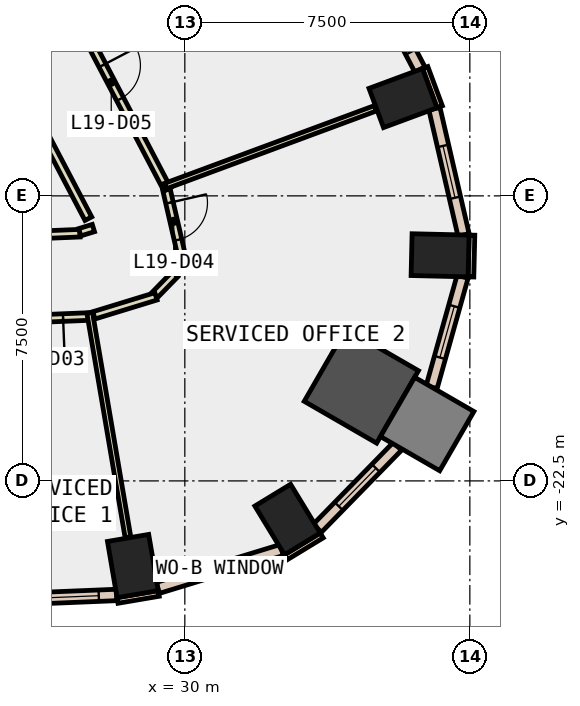
"""IFC4 building model, lengths in metres.
Left out: names, types, materials, properties, quantities, classifications, styles, units other than length and angle.
Written with IfcOpenShell. Run it as: python <this file> out.ifc"""

import sys

from ifc_helpers import new_model, si_unit, direction, frame, frame_2d, origin, origin_2d, place, context, subcontext, project, spatial, rectangle, extrude, element, fill, save


model = new_model("IFC4")
c1 = context("Model", 3, precision=1e-05, world=origin(), true_north=direction((0.0, 1.0)))
c2 = subcontext(c1, "Body", "Model", "MODEL_VIEW")
j1 = project(units=[si_unit("LENGTHUNIT", "METRE"), si_unit("PLANEANGLEUNIT", "RADIAN")], contexts=[c1])
p1 = place(None, origin())
s1 = spatial("IfcSite", under=j1, at=p1, CompositionType="ELEMENT")
p2 = place(p1, origin())
s2 = spatial("IfcBuilding", under=s1, at=p2, CompositionType="ELEMENT")
p3 = place(p2, frame((0.0, 0.0, 90.8)))
s3 = spatial("IfcBuildingStorey", under=s2, at=p3, CompositionType="ELEMENT", Elevation=90.8)
for number, where, z_axis, x_axis in (
    (1, (28.633, -24.74, -0.4), (0.0, 0.0, 1.0), (0.986, 0.168, 0.0)),
    (2, (32.703, -23.516, -0.4), (0.0, 0.0, 1.0), (0.854, 0.52, 0.0)),
):
    element("IfcColumn", number, at=place(p3, frame(where, z_axis=z_axis, x_axis=x_axis)), inside=s3, PredefinedType="COLUMN", context=c2, shape_type="SweptSolid", body=[
        extrude(rectangle(XDim=1.1, YDim=1.5, at=origin_2d()), origin(), (0.0, 0.0, 1.0), 4.2),
    ])
p4 = place(p3, frame((34.645, -20.003, -0.4), z_axis=(0.0, 0.0, 1.0), x_axis=(-0.866025403784, 0.5, 0.0)))
e3 = element("IfcColumn", 3, at=p4, inside=s3, PredefinedType="COLUMN", context=c2, shape_type="SweptSolid", body=[
    extrude(rectangle(XDim=2.2, YDim=2.2, at=origin_2d()), origin(), (0.0, 0.0, 1.0), 4.2),
])
for number, where, z_axis, x_axis in (
    (4, (36.717, -16.564, -0.4), (0.0, 0.0, 1.0), (0.023, 1.0, 0.0)),
    (5, (35.741, -12.427, -0.4), (0.0, 0.0, 1.0), (-0.347, 0.938, 0.0)),
):
    element("IfcColumn", number, at=place(p3, frame(where, z_axis=z_axis, x_axis=x_axis)), inside=s3, PredefinedType="COLUMN", context=c2, shape_type="SweptSolid", body=[
        extrude(rectangle(XDim=1.1, YDim=1.5, at=origin_2d()), origin(), (0.0, 0.0, 1.0), 4.2),
    ])
p5 = place(p3, frame((36.377, -21.003, -0.4), z_axis=(0.0, 0.0, 1.0), x_axis=(-0.866025403784, 0.5, 0.0)))
e6 = element("IfcColumn", 6, at=p5, inside=s3, PredefinedType="COLUMN", context=c2, shape_type="SweptSolid", body=[
    extrude(rectangle(XDim=1.8, YDim=1.8, at=origin_2d()), origin(), (0.0, 0.0, 1.0), 4.2),
])
p6 = place(p3, frame((36.706, -12.656, 0.0), z_axis=(0.0, 0.0, 1.0), x_axis=(-0.347205967468, 0.937788897436, 0.0)))
e7 = element("IfcWall", 7, at=p6, inside=s3, PredefinedType="STANDARD", context=c2, shape_type="SweptSolid", body=[
    extrude(rectangle(XDim=1.1, YDim=0.15, at=frame_2d((0.55, 0.0))), origin(), (0.0, 0.0, 1.0), 3.8),
])
p7 = place(p3, frame((28.229, -25.646, 0.0), z_axis=(0.0, 0.0, 1.0), x_axis=(0.985763338892, 0.168138751323, 0.0)))
e8 = element("IfcWall", 8, at=p7, inside=s3, PredefinedType="STANDARD", context=c2, shape_type="SweptSolid", body=[
    extrude(rectangle(XDim=1.101, YDim=0.15, at=frame_2d((0.55, 0.0))), origin(), (0.0, 0.0, 1.0), 3.8),
])
for number, where, z_axis, x_axis in (
    (9, (32.662, -24.507, 0.0), (0.0, 0.0, 1.0), (0.854, 0.52, 0.0)),
    (10, (37.529, -17.133, 0.0), (0.0, 0.0, 1.0), (0.024, 1.0, 0.0)),
):
    element("IfcWall", number, at=place(p3, frame(where, z_axis=z_axis, x_axis=x_axis)), inside=s3, PredefinedType="STANDARD", context=c2, shape_type="SweptSolid", body=[
        extrude(rectangle(XDim=1.1, YDim=0.15, at=frame_2d((0.55, 0.0))), origin(), (0.0, 0.0, 1.0), 3.8),
    ])
p8 = place(p3, frame((22.332, -25.742, 0.0), z_axis=(0.0, 0.0, 1.0), x_axis=(0.999159360905, 0.040994774244, 0.0)))
e11 = element("IfcWall", 11, at=p8, inside=s3, PredefinedType="STANDARD", context=c2, shape_type="SweptSolid", body=[
    extrude(rectangle(XDim=5.878, YDim=0.3, at=frame_2d((2.939, 0.0))), origin(), (0.0, 0.0, 1.0), 3.8),
])
p9 = place(p8, frame((0.469, 0.0, 0.9)))
e12 = element("IfcOpeningElement", 12, at=p9, cuts=e11, PredefinedType="OPENING", context=c2, shape_type="SweptSolid", body=[
    extrude(rectangle(XDim=2.0, YDim=2.6, at=frame_2d((1.0, 1.3))), frame((0.0, 0.16, 0.0), z_axis=(0.0, -1.0, 0.0), x_axis=(1.0, 0.0, 0.0)), (0.0, 0.0, 1.0), 0.32),
])
p10 = place(p8, frame((3.408, 0.0, 0.9)))
e13 = element("IfcOpeningElement", 13, at=p10, cuts=e11, PredefinedType="OPENING", context=c2, shape_type="SweptSolid", body=[
    extrude(rectangle(XDim=2.0, YDim=2.6, at=frame_2d((1.0, 1.3))), frame((0.0, 0.16, 0.0), z_axis=(0.0, -1.0, 0.0), x_axis=(1.0, 0.0, 0.0)), (0.0, 0.0, 1.0), 0.32),
])
p11 = place(p3, frame((29.288, -25.316, 0.0), z_axis=(0.0, 0.0, 1.0), x_axis=(0.956317661006, 0.292329490895, 0.0)))
e14 = element("IfcWall", 14, at=p11, inside=s3, PredefinedType="STANDARD", context=c2, shape_type="SweptSolid", body=[
    extrude(rectangle(XDim=3.41, YDim=0.3, at=frame_2d((1.705, 0.0))), origin(), (0.0, 0.0, 1.0), 3.8),
])
p12 = place(p11, frame((1.005, 0.0, 0.9)))
e15 = element("IfcOpeningElement", 15, at=p12, cuts=e14, PredefinedType="OPENING", context=c2, shape_type="SweptSolid", body=[
    extrude(rectangle(XDim=1.4, YDim=2.6, at=frame_2d((0.7, 1.3))), frame((0.0, 0.16, 0.0), z_axis=(0.0, -1.0, 0.0), x_axis=(1.0, 0.0, 0.0)), (0.0, 0.0, 1.0), 0.32),
])
p13 = place(p3, frame((33.486, -23.747, 0.0), z_axis=(0.0, 0.0, 1.0), x_axis=(0.698928244773, 0.715191798512, 0.0)))
e16 = element("IfcWall", 16, at=p13, inside=s3, PredefinedType="STANDARD", context=c2, shape_type="SweptSolid", body=[
    extrude(rectangle(XDim=3.017, YDim=0.3, at=frame_2d((1.509, 0.0))), origin(), (0.0, 0.0, 1.0), 3.8),
])
p14 = place(p13, frame((0.809, 0.0, 0.9)))
e17 = element("IfcOpeningElement", 17, at=p14, cuts=e16, PredefinedType="OPENING", context=c2, shape_type="SweptSolid", body=[
    extrude(rectangle(XDim=1.4, YDim=2.6, at=frame_2d((0.7, 1.3))), frame((0.0, 0.16, 0.0), z_axis=(0.0, -1.0, 0.0), x_axis=(1.0, 0.0, 0.0)), (0.0, 0.0, 1.0), 0.32),
])
p15 = place(p3, frame((36.494, -20.032, 0.0), z_axis=(0.0, 0.0, 1.0), x_axis=(0.270176120308, 0.962810918102, 0.0)))
e18 = element("IfcWall", 18, at=p15, inside=s3, PredefinedType="STANDARD", context=c2, shape_type="SweptSolid", body=[
    extrude(rectangle(XDim=3.017, YDim=0.3, at=frame_2d((1.509, 0.0))), origin(), (0.0, 0.0, 1.0), 3.8),
])
p16 = place(p15, frame((0.809, 0.0, 0.9)))
e19 = element("IfcOpeningElement", 19, at=p16, cuts=e18, PredefinedType="OPENING", context=c2, shape_type="SweptSolid", body=[
    extrude(rectangle(XDim=1.4, YDim=2.6, at=frame_2d((0.7, 1.3))), frame((0.0, 0.16, 0.0), z_axis=(0.0, -1.0, 0.0), x_axis=(1.0, 0.0, 0.0)), (0.0, 0.0, 1.0), 0.32),
])
p17 = place(p3, frame((37.335, -16.029, 0.0), z_axis=(0.0, 0.0, 1.0), x_axis=(-0.224859506699, 0.974391195695, 0.0)))
e20 = element("IfcWall", 20, at=p17, inside=s3, PredefinedType="STANDARD", context=c2, shape_type="SweptSolid", body=[
    extrude(rectangle(XDim=3.41, YDim=0.3, at=frame_2d((1.705, 0.0))), origin(), (0.0, 0.0, 1.0), 3.8),
])
p18 = place(p17, frame((1.005, 0.0, 0.9)))
e21 = element("IfcOpeningElement", 21, at=p18, cuts=e20, PredefinedType="OPENING", context=c2, shape_type="SweptSolid", body=[
    extrude(rectangle(XDim=1.4, YDim=2.6, at=frame_2d((0.7, 1.3))), frame((0.0, 0.16, 0.0), z_axis=(0.0, -1.0, 0.0), x_axis=(1.0, 0.0, 0.0)), (0.0, 0.0, 1.0), 0.32),
])
p19 = place(p3, frame((36.186, -11.676, 0.0), z_axis=(0.0, 0.0, 1.0), x_axis=(-0.464187178015, 0.885737130173, 0.0)))
e22 = element("IfcWall", 22, at=p19, inside=s3, PredefinedType="STANDARD", context=c2, shape_type="SweptSolid", body=[
    extrude(rectangle(XDim=6.075, YDim=0.3, at=frame_2d((3.038, 0.0))), origin(), (0.0, 0.0, 1.0), 3.8),
])
p20 = place(p19, frame((0.519, 0.0, 0.9)))
e23 = element("IfcOpeningElement", 23, at=p20, cuts=e22, PredefinedType="OPENING", context=c2, shape_type="SweptSolid", body=[
    extrude(rectangle(XDim=2.0, YDim=2.6, at=frame_2d((1.0, 1.3))), frame((0.0, 0.16, 0.0), z_axis=(0.0, -1.0, 0.0), x_axis=(1.0, 0.0, 0.0)), (0.0, 0.0, 1.0), 0.32),
])
p21 = place(p19, frame((3.556, 0.0, 0.9)))
e24 = element("IfcOpeningElement", 24, at=p21, cuts=e22, PredefinedType="OPENING", context=c2, shape_type="SweptSolid", body=[
    extrude(rectangle(XDim=2.0, YDim=2.6, at=frame_2d((1.0, 1.3))), frame((0.0, 0.16, 0.0), z_axis=(0.0, -1.0, 0.0), x_axis=(1.0, 0.0, 0.0)), (0.0, 0.0, 1.0), 0.32),
])
p22 = place(p3, frame((21.446, -16.22, 0.0), z_axis=(0.0, 0.0, 1.0), x_axis=(0.999157128819, 0.041049140426, 0.0)))
e25 = element("IfcWall", 25, at=p22, inside=s3, PredefinedType="PARTITIONING", context=c2, shape_type="SweptSolid", body=[
    extrude(rectangle(XDim=5.799, YDim=0.2, at=frame_2d((2.899, 0.0))), origin(), (0.0, 0.0, 1.0), 3.8),
])
p23 = place(p3, frame((27.235, -15.957, 0.0), z_axis=(0.0, 0.0, 1.0), x_axis=(0.956017741345, 0.293308844453, 0.0)))
e26 = element("IfcWall", 26, at=p23, inside=s3, PredefinedType="PARTITIONING", context=c2, shape_type="SweptSolid", body=[
    extrude(rectangle(XDim=0.375, YDim=0.2, at=frame_2d((0.188, 0.0))), origin(), (0.0, 0.0, 1.0), 3.8),
])
p24 = place(p3, frame((27.461, -15.6, 0.0), z_axis=(0.0, 0.0, 1.0), x_axis=(-0.464203280494, 0.885728691179, 0.0)))
e27 = element("IfcWall", 27, at=p24, inside=s3, PredefinedType="PARTITIONING", context=c2, shape_type="SweptSolid", body=[
    extrude(rectangle(XDim=5.995, YDim=0.2, at=frame_2d((2.998, 0.0))), origin(), (0.0, 0.0, 1.0), 3.8),
])
p25 = place(p3, frame((27.538, -18.172, 0.0), z_axis=(0.0, 0.0, 1.0), x_axis=(-0.999161261417, -0.040948427126, 0.0)))
e28 = element("IfcWall", 28, at=p25, inside=s3, PredefinedType="PARTITIONING", context=c2, shape_type="SweptSolid", body=[
    extrude(rectangle(XDim=2.486, YDim=0.2, at=frame_2d((1.243, 0.0))), origin(), (0.0, 0.0, 1.0), 3.8),
])
p26 = place(p25, frame((0.743, 0.0, 0.0)))
e29 = element("IfcOpeningElement", 29, at=p26, cuts=e28, PredefinedType="OPENING", context=c2, shape_type="SweptSolid", body=[
    extrude(rectangle(XDim=1.0, YDim=2.1, at=frame_2d((0.5, 1.05))), frame((0.0, 0.11, 0.0), z_axis=(0.0, -1.0, 0.0), x_axis=(1.0, 0.0, 0.0)), (0.0, 0.0, 1.0), 0.22),
])
p27 = place(p3, frame((29.517, -14.838, 0.0), z_axis=(0.0, 0.0, 1.0), x_axis=(0.224316169854, -0.974516421587, 0.0)))
e30 = element("IfcWall", 30, at=p27, inside=s3, PredefinedType="PARTITIONING", context=c2, shape_type="SweptSolid", body=[
    extrude(rectangle(XDim=1.707, YDim=0.2, at=frame_2d((0.853, 0.0))), origin(), (0.0, 0.0, 1.0), 3.8),
])
p28 = place(p27, frame((0.353, 0.0, 0.0)))
e31 = element("IfcOpeningElement", 31, at=p28, cuts=e30, PredefinedType="OPENING", context=c2, shape_type="SweptSolid", body=[
    extrude(rectangle(XDim=1.0, YDim=2.1, at=frame_2d((0.5, 1.05))), frame((0.0, 0.11, 0.0), z_axis=(0.0, -1.0, 0.0), x_axis=(1.0, 0.0, 0.0)), (0.0, 0.0, 1.0), 0.22),
])
p29 = place(p3, frame((29.851, -16.5, 0.0), z_axis=(0.0, 0.0, 1.0), x_axis=(-0.269792639482, -0.962918444979, 0.0)))
e32 = element("IfcWall", 32, at=p29, inside=s3, PredefinedType="PARTITIONING", context=c2, shape_type="SweptSolid", body=[
    extrude(rectangle(XDim=0.557, YDim=0.2, at=frame_2d((0.278, 0.0))), origin(), (0.0, 0.0, 1.0), 3.8),
])
p30 = place(p3, frame((29.743, -17.061, 0.0), z_axis=(0.0, 0.0, 1.0), x_axis=(-0.698331924638, -0.715774072617, 0.0)))
e33 = element("IfcWall", 33, at=p30, inside=s3, PredefinedType="PARTITIONING", context=c2, shape_type="SweptSolid", body=[
    extrude(rectangle(XDim=0.756, YDim=0.2, at=frame_2d((0.378, 0.0))), origin(), (0.0, 0.0, 1.0), 3.8),
])
p31 = place(p3, frame((29.24, -17.644, 0.0), z_axis=(0.0, 0.0, 1.0), x_axis=(-0.956137025409, -0.292919764852, 0.0)))
e34 = element("IfcWall", 34, at=p31, inside=s3, PredefinedType="PARTITIONING", context=c2, shape_type="SweptSolid", body=[
    extrude(rectangle(XDim=1.707, YDim=0.2, at=frame_2d((0.854, 0.0))), origin(), (0.0, 0.0, 1.0), 3.8),
])
p32 = place(p3, frame((26.586, -9.191, 0.0), z_axis=(0.0, 0.0, 1.0), x_axis=(0.46422194761, -0.885718907643, 0.0)))
e35 = element("IfcWall", 35, at=p32, inside=s3, PredefinedType="PARTITIONING", context=c2, shape_type="SweptSolid", body=[
    extrude(rectangle(XDim=6.366, YDim=0.2, at=frame_2d((3.183, 0.0))), origin(), (0.0, 0.0, 1.0), 3.8),
])
p33 = place(p32, frame((2.683, 0.0, 0.0)))
e36 = element("IfcOpeningElement", 36, at=p33, cuts=e35, PredefinedType="OPENING", context=c2, shape_type="SweptSolid", body=[
    extrude(rectangle(XDim=1.0, YDim=2.1, at=frame_2d((0.5, 1.05))), frame((0.0, 0.11, 0.0), z_axis=(0.0, -1.0, 0.0), x_axis=(1.0, 0.0, 0.0)), (0.0, 0.0, 1.0), 0.22),
])
p34 = place(p3, frame((27.496, -18.074, 0.0), z_axis=(0.0, 0.0, 1.0), x_axis=(0.168025125373, -0.985782712997, 0.0)))
e37 = element("IfcWall", 37, at=p34, inside=s3, PredefinedType="PARTITIONING", context=c2, shape_type="SweptSolid", body=[
    extrude(rectangle(XDim=5.992, YDim=0.15, at=frame_2d((2.996, 0.0))), origin(), (0.0, 0.0, 1.0), 3.8),
])
p35 = place(p3, frame((29.494, -14.741, 0.0), z_axis=(0.0, 0.0, 1.0), x_axis=(0.937719767819, 0.347392626636, 0.0)))
e38 = element("IfcWall", 38, at=p35, inside=s3, PredefinedType="PARTITIONING", context=c2, shape_type="SweptSolid", body=[
    extrude(rectangle(XDim=5.892, YDim=0.15, at=frame_2d((2.946, 0.0))), origin(), (0.0, 0.0, 1.0), 3.8),
])
p36 = place(p10, origin())
e39 = element("IfcWindow", 39, at=p36, inside=s3, PartitioningType="SINGLE_PANEL", PredefinedType="WINDOW", context=c2, shape_type="SweptSolid", body=[
    extrude(rectangle(XDim=2.0, YDim=2.6, at=frame_2d((1.0, 1.3))), frame((0.0, 0.03, 0.0), z_axis=(0.0, -1.0, 0.0), x_axis=(1.0, 0.0, 0.0)), (0.0, 0.0, 1.0), 0.06),
])
fill(e13, e39)
p37 = place(p12, origin())
e40 = element("IfcWindow", 40, at=p37, inside=s3, PartitioningType="SINGLE_PANEL", PredefinedType="WINDOW", context=c2, shape_type="SweptSolid", body=[
    extrude(rectangle(XDim=1.4, YDim=2.6, at=frame_2d((0.7, 1.3))), frame((0.0, 0.03, 0.0), z_axis=(0.0, -1.0, 0.0), x_axis=(1.0, 0.0, 0.0)), (0.0, 0.0, 1.0), 0.06),
])
fill(e15, e40)
p38 = place(p14, origin())
e41 = element("IfcWindow", 41, at=p38, inside=s3, PartitioningType="SINGLE_PANEL", PredefinedType="WINDOW", context=c2, shape_type="SweptSolid", body=[
    extrude(rectangle(XDim=1.4, YDim=2.6, at=frame_2d((0.7, 1.3))), frame((0.0, 0.03, 0.0), z_axis=(0.0, -1.0, 0.0), x_axis=(1.0, 0.0, 0.0)), (0.0, 0.0, 1.0), 0.06),
])
fill(e17, e41)
p39 = place(p16, origin())
e42 = element("IfcWindow", 42, at=p39, inside=s3, PartitioningType="SINGLE_PANEL", PredefinedType="WINDOW", context=c2, shape_type="SweptSolid", body=[
    extrude(rectangle(XDim=1.4, YDim=2.6, at=frame_2d((0.7, 1.3))), frame((0.0, 0.03, 0.0), z_axis=(0.0, -1.0, 0.0), x_axis=(1.0, 0.0, 0.0)), (0.0, 0.0, 1.0), 0.06),
])
fill(e19, e42)
p40 = place(p18, origin())
e43 = element("IfcWindow", 43, at=p40, inside=s3, PartitioningType="SINGLE_PANEL", PredefinedType="WINDOW", context=c2, shape_type="SweptSolid", body=[
    extrude(rectangle(XDim=1.4, YDim=2.6, at=frame_2d((0.7, 1.3))), frame((0.0, 0.03, 0.0), z_axis=(0.0, -1.0, 0.0), x_axis=(1.0, 0.0, 0.0)), (0.0, 0.0, 1.0), 0.06),
])
fill(e21, e43)
p41 = place(p20, origin())
e44 = element("IfcWindow", 44, at=p41, inside=s3, PartitioningType="SINGLE_PANEL", PredefinedType="WINDOW", context=c2, shape_type="SweptSolid", body=[
    extrude(rectangle(XDim=2.0, YDim=2.6, at=frame_2d((1.0, 1.3))), frame((0.0, 0.03, 0.0), z_axis=(0.0, -1.0, 0.0), x_axis=(1.0, 0.0, 0.0)), (0.0, 0.0, 1.0), 0.06),
])
fill(e23, e44)
p42 = place(p26, origin())
e45 = element("IfcDoor", 45, at=p42, inside=s3, OperationType="SINGLE_SWING_LEFT", PredefinedType="DOOR", context=c2, shape_type="SweptSolid", body=[
    extrude(rectangle(XDim=1.0, YDim=2.1, at=frame_2d((0.5, 1.05))), frame((0.0, 0.025, 0.0), z_axis=(0.0, -1.0, 0.0), x_axis=(1.0, 0.0, 0.0)), (0.0, 0.0, 1.0), 0.05),
])
fill(e29, e45)
p43 = place(p28, origin())
e46 = element("IfcDoor", 46, at=p43, inside=s3, OperationType="SINGLE_SWING_RIGHT", PredefinedType="DOOR", context=c2, shape_type="SweptSolid", body=[
    extrude(rectangle(XDim=1.0, YDim=2.1, at=frame_2d((0.5, 1.05))), frame((0.0, 0.025, 0.0), z_axis=(0.0, -1.0, 0.0), x_axis=(1.0, 0.0, 0.0)), (0.0, 0.0, 1.0), 0.05),
])
fill(e31, e46)
p44 = place(p33, origin())
e47 = element("IfcDoor", 47, at=p44, inside=s3, OperationType="SINGLE_SWING_LEFT", PredefinedType="DOOR", context=c2, shape_type="SweptSolid", body=[
    extrude(rectangle(XDim=1.0, YDim=2.1, at=frame_2d((0.5, 1.05))), frame((0.0, 0.025, 0.0), z_axis=(0.0, -1.0, 0.0), x_axis=(1.0, 0.0, 0.0)), (0.0, 0.0, 1.0), 0.05),
])
fill(e36, e47)
save(model, sys.argv[1])
